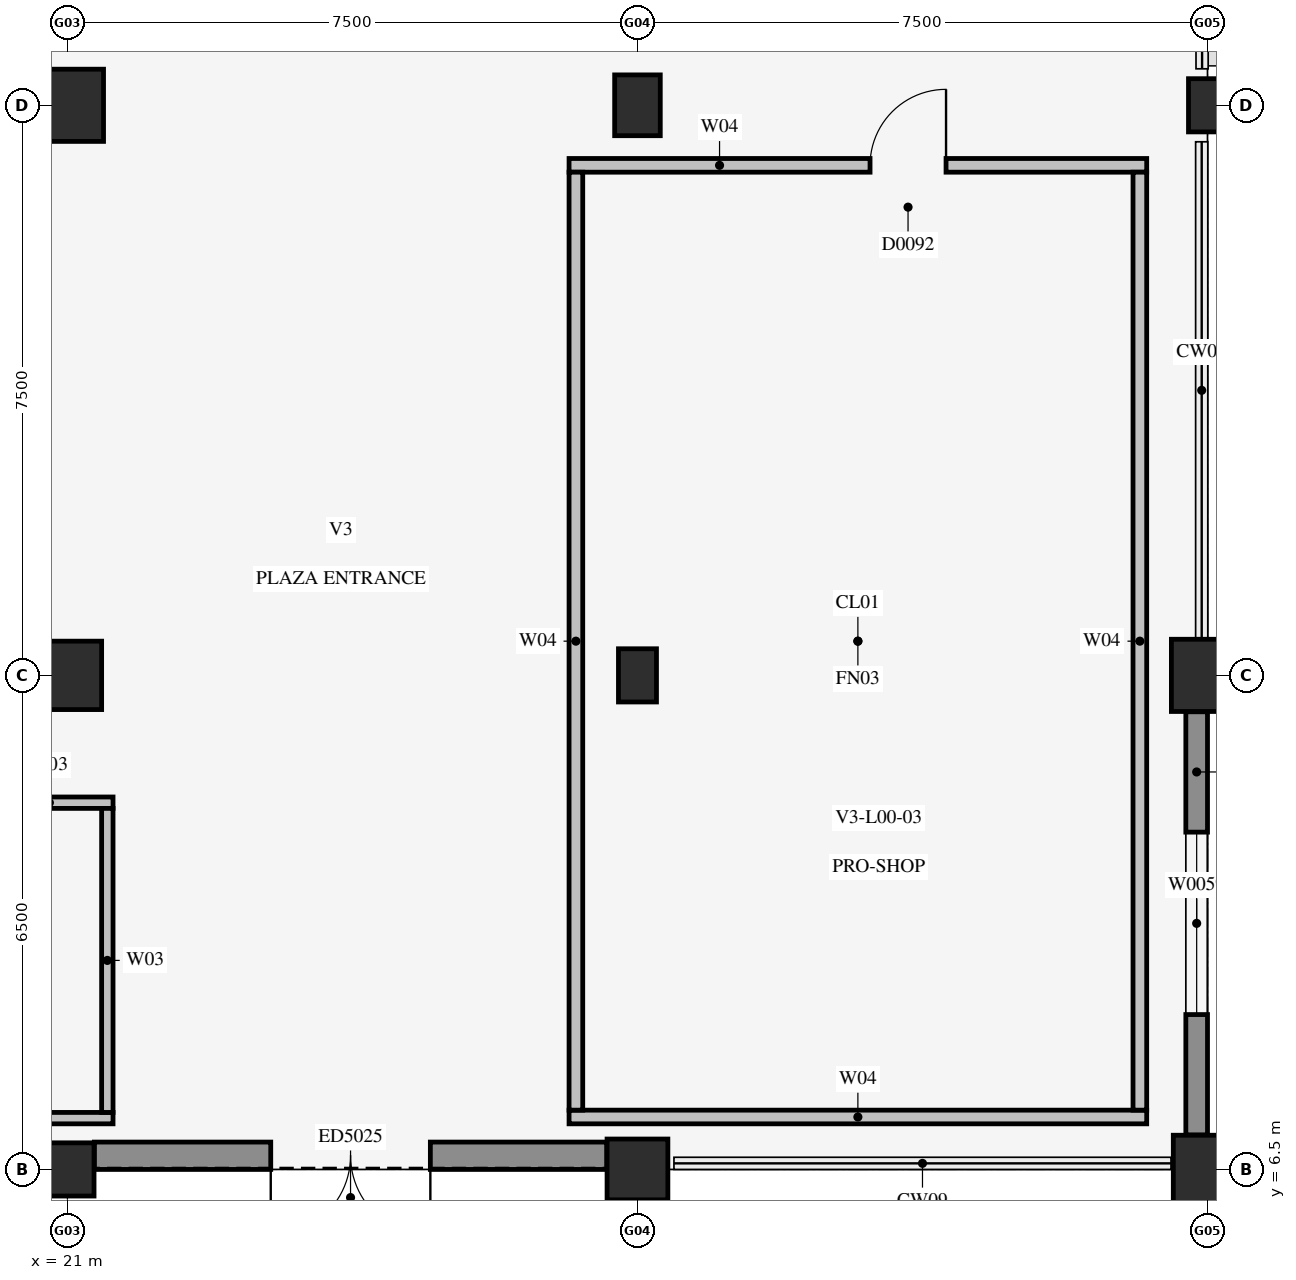
"""IFC4 building model, lengths in metres.
Left out: names, types, materials, properties, quantities, classifications, styles, units other than length and angle.
Written with IfcOpenShell. Run it as: python <this file> out.ifc"""

import sys

from ifc_helpers import new_model, si_unit, direction, frame, frame_2d, origin, origin_2d, place, context, subcontext, project, spatial, rectangle, extrude, element, fill, save


model = new_model("IFC4")
c1 = context("Model", 3, precision=1e-05, world=origin(), true_north=direction((0.0, 1.0)))
c2 = subcontext(c1, "Body", "Model", "MODEL_VIEW")
j1 = project(units=[si_unit("LENGTHUNIT", "METRE"), si_unit("PLANEANGLEUNIT", "RADIAN")], contexts=[c1])
p1 = place(None, origin())
s1 = spatial("IfcSite", under=j1, at=p1, CompositionType="ELEMENT")
p2 = place(p1, origin())
s2 = spatial("IfcBuilding", under=s1, at=p2, CompositionType="ELEMENT")
p3 = place(p2, origin())
s3 = spatial("IfcBuildingStorey", under=s2, at=p3, CompositionType="ELEMENT", Elevation=0.0)
p4 = place(p3, frame((21.0, 6.5, 0.0), z_axis=(0.0, 0.0, 1.0), x_axis=(1.0, 0.0, 0.0)))
e1 = element("IfcColumn", 1, at=p4, inside=s3, PredefinedType="COLUMN", context=c2, shape_type="SweptSolid", body=[
    extrude(rectangle(XDim=0.7, YDim=0.7, at=origin_2d()), origin(), (0.0, 0.0, 1.0), 5.4),
])
p5 = place(p3, frame((21.0, 13.0, 0.0), z_axis=(0.0, 0.0, 1.0), x_axis=(1.0, 0.0, 0.0)))
e2 = element("IfcColumn", 2, at=p5, inside=s3, PredefinedType="COLUMN", context=c2, shape_type="SweptSolid", body=[
    extrude(rectangle(XDim=0.9, YDim=0.9, at=origin_2d()), origin(), (0.0, 0.0, 1.0), 5.4),
])
p6 = place(p3, frame((21.0, 20.5, 0.0), z_axis=(0.0, 0.0, 1.0), x_axis=(1.0, 0.0, 0.0)))
e3 = element("IfcColumn", 3, at=p6, inside=s3, PredefinedType="COLUMN", context=c2, shape_type="SweptSolid", body=[
    extrude(rectangle(XDim=0.95, YDim=0.95, at=origin_2d()), origin(), (0.0, 0.0, 1.0), 5.4),
])
p7 = place(p3, frame((28.5, 6.5, 0.0), z_axis=(0.0, 0.0, 1.0), x_axis=(1.0, 0.0, 0.0)))
e4 = element("IfcColumn", 4, at=p7, inside=s3, PredefinedType="COLUMN", context=c2, shape_type="SweptSolid", body=[
    extrude(rectangle(XDim=0.8, YDim=0.8, at=origin_2d()), origin(), (0.0, 0.0, 1.0), 5.4),
])
p8 = place(p3, frame((28.5, 13.0, 0.0), z_axis=(0.0, 0.0, 1.0), x_axis=(1.0, 0.0, 0.0)))
e5 = element("IfcColumn", 5, at=p8, inside=s3, PredefinedType="COLUMN", context=c2, shape_type="SweptSolid", body=[
    extrude(rectangle(XDim=0.5, YDim=0.7, at=origin_2d()), origin(), (0.0, 0.0, 1.0), 5.4),
])
p9 = place(p3, frame((28.5, 20.5, 0.0), z_axis=(0.0, 0.0, 1.0), x_axis=(1.0, 0.0, 0.0)))
e6 = element("IfcColumn", 6, at=p9, inside=s3, PredefinedType="COLUMN", context=c2, shape_type="SweptSolid", body=[
    extrude(rectangle(XDim=0.6, YDim=0.8, at=origin_2d()), origin(), (0.0, 0.0, 1.0), 5.4),
])
p10 = place(p3, frame((36.0, 6.5, 0.0), z_axis=(0.0, 0.0, 1.0), x_axis=(1.0, 0.0, 0.0)))
e7 = element("IfcColumn", 7, at=p10, inside=s3, PredefinedType="COLUMN", context=c2, shape_type="SweptSolid", body=[
    extrude(rectangle(XDim=0.9, YDim=0.9, at=origin_2d()), origin(), (0.0, 0.0, 1.0), 5.4),
])
p11 = place(p3, frame((36.0, 13.0, 0.0), z_axis=(0.0, 0.0, 1.0), x_axis=(1.0, 0.0, 0.0)))
e8 = element("IfcColumn", 8, at=p11, inside=s3, PredefinedType="COLUMN", context=c2, shape_type="SweptSolid", body=[
    extrude(rectangle(XDim=0.95, YDim=0.95, at=origin_2d()), origin(), (0.0, 0.0, 1.0), 5.4),
])
p12 = place(p3, frame((36.0, 20.5, 0.0), z_axis=(0.0, 0.0, 1.0), x_axis=(1.0, 0.0, 0.0)))
e9 = element("IfcColumn", 9, at=p12, inside=s3, PredefinedType="COLUMN", context=c2, shape_type="SweptSolid", body=[
    extrude(rectangle(XDim=0.5, YDim=0.7, at=origin_2d()), origin(), (0.0, 0.0, 1.0), 5.4),
])
p13 = place(p3, frame((17.9, 7.175, 0.0), z_axis=(0.0, 0.0, 1.0), x_axis=(1.0, 0.0, 0.0)))
e10 = element("IfcWall", 10, at=p13, inside=s3, PredefinedType="PARTITIONING", context=c2, shape_type="SweptSolid", body=[
    extrude(rectangle(XDim=3.7, YDim=0.15, at=frame_2d((1.85, 0.0))), origin(), (0.0, 0.0, 1.0), 5.145),
])
p14 = place(p3, frame((17.9, 11.325, 0.0), z_axis=(0.0, 0.0, 1.0), x_axis=(1.0, 0.0, 0.0)))
e11 = element("IfcWall", 11, at=p14, inside=s3, PredefinedType="PARTITIONING", context=c2, shape_type="SweptSolid", body=[
    extrude(rectangle(XDim=3.7, YDim=0.15, at=frame_2d((1.85, 0.0))), origin(), (0.0, 0.0, 1.0), 5.145),
])
p15 = place(p14, frame((0.925, 0.0, 0.0)))
e12 = element("IfcOpeningElement", 12, at=p15, cuts=e11, PredefinedType="OPENING", context=c2, shape_type="SweptSolid", body=[
    extrude(rectangle(XDim=1.1, YDim=2.25, at=frame_2d((0.55, 1.125))), frame((0.0, 0.087, 0.0), z_axis=(0.0, -1.0, 0.0), x_axis=(1.0, 0.0, 0.0)), (0.0, 0.0, 1.0), 0.174),
])
p16 = place(p3, frame((21.525, 7.25, 0.0), z_axis=(0.0, 0.0, 1.0), x_axis=(0.0, 1.0, 0.0)))
e13 = element("IfcWall", 13, at=p16, inside=s3, PredefinedType="PARTITIONING", context=c2, shape_type="SweptSolid", body=[
    extrude(rectangle(XDim=4.0, YDim=0.15, at=frame_2d((2.0, 0.0))), origin(), (0.0, 0.0, 1.0), 5.145),
])
p17 = place(p3, frame((27.6, 7.19, 0.0), z_axis=(0.0, 0.0, 1.0), x_axis=(1.0, 0.0, 0.0)))
e14 = element("IfcWall", 14, at=p17, inside=s3, PredefinedType="PARTITIONING", context=c2, shape_type="SweptSolid", body=[
    extrude(rectangle(XDim=7.6, YDim=0.18, at=frame_2d((3.8, 0.0))), origin(), (0.0, 0.0, 1.0), 5.145),
])
p18 = place(p3, frame((27.6, 19.71, 0.0), z_axis=(0.0, 0.0, 1.0), x_axis=(1.0, 0.0, 0.0)))
e15 = element("IfcWall", 15, at=p18, inside=s3, PredefinedType="PARTITIONING", context=c2, shape_type="SweptSolid", body=[
    extrude(rectangle(XDim=7.6, YDim=0.18, at=frame_2d((3.8, 0.0))), origin(), (0.0, 0.0, 1.0), 5.145),
])
p19 = place(p18, frame((3.96, 0.0, 0.0)))
e16 = element("IfcOpeningElement", 16, at=p19, cuts=e15, PredefinedType="OPENING", context=c2, shape_type="SweptSolid", body=[
    extrude(rectangle(XDim=1.0, YDim=2.2, at=frame_2d((0.5, 1.1))), frame((0.0, 0.102, 0.0), z_axis=(0.0, -1.0, 0.0), x_axis=(1.0, 0.0, 0.0)), (0.0, 0.0, 1.0), 0.204),
])
for number, where, z_axis, x_axis in (
    (17, (35.11, 7.28, 0.0), (0.0, 0.0, 1.0), (0.0, 1.0, 0.0)),
    (18, (27.69, 7.28, 0.0), (0.0, 0.0, 1.0), (0.0, 1.0, 0.0)),
):
    element("IfcWall", number, at=place(p3, frame(where, z_axis=z_axis, x_axis=x_axis)), inside=s3, PredefinedType="PARTITIONING", context=c2, shape_type="SweptSolid", body=[
        extrude(rectangle(XDim=12.34, YDim=0.18, at=frame_2d((6.17, 0.0))), origin(), (0.0, 0.0, 1.0), 5.145),
    ])
p20 = place(p3, frame((21.354, 6.68, 0.0), z_axis=(0.0, 0.0, 1.0), x_axis=(1.0, 0.0, 0.0)))
e19 = element("IfcWall", 19, at=p20, inside=s3, PredefinedType="SOLIDWALL", context=c2, shape_type="SweptSolid", body=[
    extrude(rectangle(XDim=6.742, YDim=0.36, at=frame_2d((3.371, 0.0))), origin(), (0.0, 0.0, 1.0), 4.518),
])
p21 = place(p20, frame((2.321, 0.0, 0.0)))
e20 = element("IfcOpeningElement", 20, at=p21, cuts=e19, PredefinedType="OPENING", context=c2, shape_type="SweptSolid", body=[
    extrude(rectangle(XDim=2.1, YDim=2.5, at=frame_2d((1.05, 1.25))), frame((0.0, 0.192, 0.0), z_axis=(0.0, -1.0, 0.0), x_axis=(1.0, 0.0, 0.0)), (0.0, 0.0, 1.0), 0.384),
])
p22 = place(p3, frame((35.857, 6.954, 0.0), z_axis=(0.0, 0.0, 1.0), x_axis=(0.0, 1.0, 0.0)))
e21 = element("IfcWall", 21, at=p22, inside=s3, PredefinedType="SOLIDWALL", context=c2, shape_type="SweptSolid", body=[
    extrude(rectangle(XDim=5.567, YDim=0.285, at=frame_2d((2.783, 0.0))), origin(), (0.0, 0.0, 1.0), 4.594),
])
p23 = place(p22, frame((1.583, 0.0, 0.95)))
e22 = element("IfcOpeningElement", 22, at=p23, cuts=e21, PredefinedType="OPENING", context=c2, shape_type="SweptSolid", body=[
    extrude(rectangle(XDim=2.4, YDim=1.8, at=frame_2d((1.2, 0.9))), frame((0.0, 0.154, 0.0), z_axis=(0.0, -1.0, 0.0), x_axis=(1.0, 0.0, 0.0)), (0.0, 0.0, 1.0), 0.309),
])
p24 = place(p19, frame((1.0, 0.0, 0.0), z_axis=(0.0, 0.0, 1.0), x_axis=(-1.0, 0.0, 0.0)))
e23 = element("IfcDoor", 23, at=p24, inside=s3, OperationType="SINGLE_SWING_RIGHT", PredefinedType="DOOR", context=c2, shape_type="SweptSolid", body=[
    extrude(rectangle(XDim=1.0, YDim=2.2, at=frame_2d((0.5, 1.1))), frame((0.0, 0.025, 0.0), z_axis=(0.0, -1.0, 0.0), x_axis=(1.0, 0.0, 0.0)), (0.0, 0.0, 1.0), 0.05),
])
fill(e16, e23)
p25 = place(p21, frame((2.1, 0.0, 0.0), z_axis=(0.0, 0.0, 1.0), x_axis=(-1.0, 0.0, 0.0)))
e24 = element("IfcDoor", 24, at=p25, inside=s3, OperationType="DOUBLE_DOOR_SINGLE_SWING", PredefinedType="DOOR", context=c2, shape_type="SweptSolid", body=[
    extrude(rectangle(XDim=2.1, YDim=2.5, at=frame_2d((1.05, 1.25))), frame((0.0, 0.025, 0.0), z_axis=(0.0, -1.0, 0.0), x_axis=(1.0, 0.0, 0.0)), (0.0, 0.0, 1.0), 0.05),
])
fill(e20, e24)
p26 = place(p23, origin())
e25 = element("IfcWindow", 25, at=p26, inside=s3, PartitioningType="SINGLE_PANEL", PredefinedType="WINDOW", context=c2, shape_type="SweptSolid", body=[
    extrude(rectangle(XDim=2.4, YDim=1.8, at=frame_2d((1.2, 0.9))), frame((0.0, 0.03, 0.0), z_axis=(0.0, -1.0, 0.0), x_axis=(1.0, 0.0, 0.0)), (0.0, 0.0, 1.0), 0.06),
])
fill(e22, e25)
save(model, sys.argv[1])
